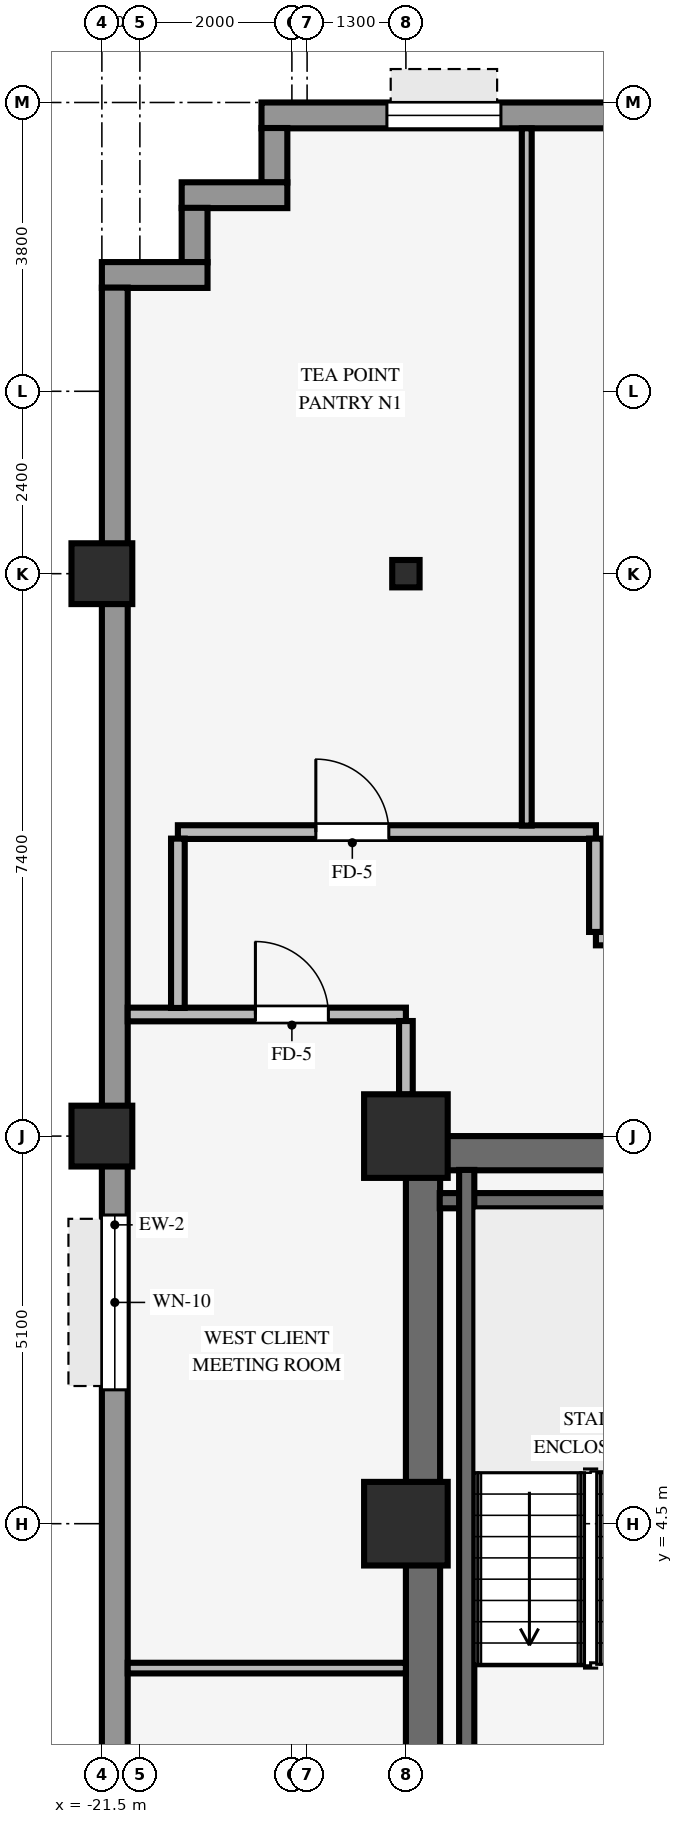
"""IFC4 building model, lengths in metres.
Left out: names, types, materials, properties, quantities, classifications, styles, units other than length and angle.
Written with IfcOpenShell. Run it as: python <this file> out.ifc"""

import sys

from ifc_helpers import new_model, si_unit, direction, frame, frame_2d, origin, origin_2d, place, context, subcontext, project, spatial, rectangle, hollow_rectangle, i_section, extrude, source, transform, mapped, element, fill, save


model = new_model("IFC4")
c1 = context("Model", 3, precision=1e-05, world=origin(), true_north=direction((0.0, 1.0)))
c2 = subcontext(c1, "Body", "Model", "MODEL_VIEW")
j1 = project(units=[si_unit("LENGTHUNIT", "METRE"), si_unit("PLANEANGLEUNIT", "RADIAN")], contexts=[c1])
p1 = place(None, origin())
s1 = spatial("IfcSite", under=j1, at=p1, CompositionType="ELEMENT")
p2 = place(p1, origin())
s2 = spatial("IfcBuilding", under=s1, at=p2, CompositionType="ELEMENT")
p3 = place(p2, frame((0.0, 0.0, 64.1)))
s3 = spatial("IfcBuildingStorey", under=s2, at=p3, CompositionType="ELEMENT", Elevation=64.1)
p4 = place(p3, frame((-17.5, 9.375, 0.0), z_axis=(0.0, 0.0, 1.0), x_axis=(1.0, 0.0, 0.0)))
e1 = element("IfcWall", 1, at=p4, inside=s3, PredefinedType="SHEAR", context=c2, shape_type="SweptSolid", body=[
    extrude(rectangle(XDim=8.5, YDim=0.45, at=frame_2d((4.25, 0.0))), origin(), (0.0, 0.0, 1.0), 3.37),
])
p5 = place(p3, frame((-17.275, -9.155, 0.0), z_axis=(0.0, 0.0, 1.0), x_axis=(0.0, 1.0, 0.0)))
e2 = element("IfcWall", 2, at=p5, inside=s3, PredefinedType="SHEAR", context=c2, shape_type="SweptSolid", body=[
    extrude(rectangle(XDim=18.31, YDim=0.45, at=frame_2d((9.155, 0.0))), origin(), (0.0, 0.0, 1.0), 3.37),
])
for number, where, z_axis, x_axis in (
    (3, (-17.5, 4.5, 0.0), (0.0, 0.0, 1.0), (1.0, 0.0, 0.0)),
    (4, (-17.5, 9.6, 0.0), (0.0, 0.0, 1.0), (1.0, 0.0, 0.0)),
):
    element("IfcColumn", number, at=place(p3, frame(where, z_axis=z_axis, x_axis=x_axis)), inside=s3, PredefinedType="COLUMN", context=c2, shape_type="SweptSolid", body=[
        extrude(rectangle(XDim=1.1, YDim=1.1, at=origin_2d()), origin(), (0.0, 0.0, 1.0), 3.37),
    ])
for number, where, z_axis, x_axis in (
    (5, (-21.5, 9.6, 0.0), (0.0, 0.0, 1.0), (1.0, 0.0, 0.0)),
    (6, (-21.5, 17.0, 0.0), (0.0, 0.0, 1.0), (1.0, 0.0, 0.0)),
):
    element("IfcColumn", number, at=place(p3, frame(where, z_axis=z_axis, x_axis=x_axis)), inside=s3, PredefinedType="COLUMN", context=c2, shape_type="SweptSolid", body=[
        extrude(hollow_rectangle(XDim=0.8, YDim=0.8, WallThickness=0.055, InnerFilletRadius=0.055, OuterFilletRadius=0.11, at=origin_2d()), origin(), (0.0, 0.0, 1.0), 3.37),
    ])
p6 = place(p3, frame((-17.5, 17.0, 0.0), z_axis=(0.0, 0.0, 1.0), x_axis=(1.0, 0.0, 0.0)))
e7 = element("IfcColumn", 7, at=p6, inside=s3, PredefinedType="COLUMN", context=c2, shape_type="SweptSolid", body=[
    extrude(i_section(OverallWidth=0.36, OverallDepth=0.36, WebThickness=0.021, FlangeThickness=0.021, FilletRadius=0.018, at=origin_2d()), origin(), (0.0, 0.0, 1.0), 3.37),
])
p7 = place(p3, frame((-19.4, 23.03, 0.0), z_axis=(0.0, 0.0, 1.0), x_axis=(1.0, 0.0, 0.0)))
e8 = element("IfcWall", 8, at=p7, inside=s3, PredefinedType="STANDARD", context=c2, shape_type="SweptSolid", body=[
    extrude(rectangle(XDim=38.8, YDim=0.34, at=frame_2d((19.4, 0.0))), origin(), (0.0, 0.0, 1.0), 2.705),
])
p8 = place(p7, frame((1.65, 0.0, 0.8)))
e9 = element("IfcOpeningElement", 9, at=p8, cuts=e8, PredefinedType="OPENING", context=c2, shape_type="SweptSolid", body=[
    extrude(rectangle(XDim=1.5, YDim=1.6, at=frame_2d((0.75, 0.8))), frame((0.0, 0.18, 0.0), z_axis=(0.0, -1.0, 0.0), x_axis=(1.0, 0.0, 0.0)), (0.0, 0.0, 1.0), 0.36),
])
p9 = place(p7, frame((7.15, 0.0, 0.8)))
e10 = element("IfcOpeningElement", 10, at=p9, cuts=e8, PredefinedType="OPENING", context=c2, shape_type="SweptSolid", body=[
    extrude(rectangle(XDim=1.5, YDim=1.6, at=frame_2d((0.75, 0.8))), frame((0.0, 0.18, 0.0), z_axis=(0.0, -1.0, 0.0), x_axis=(1.0, 0.0, 0.0)), (0.0, 0.0, 1.0), 0.36),
])
p10 = place(p7, frame((11.75, 0.0, 0.8)))
e11 = element("IfcOpeningElement", 11, at=p10, cuts=e8, PredefinedType="OPENING", context=c2, shape_type="SweptSolid", body=[
    extrude(rectangle(XDim=1.5, YDim=1.6, at=frame_2d((0.75, 0.8))), frame((0.0, 0.18, 0.0), z_axis=(0.0, -1.0, 0.0), x_axis=(1.0, 0.0, 0.0)), (0.0, 0.0, 1.0), 0.36),
])
p11 = place(p7, frame((16.35, 0.0, 0.8)))
e12 = element("IfcOpeningElement", 12, at=p11, cuts=e8, PredefinedType="OPENING", context=c2, shape_type="SweptSolid", body=[
    extrude(rectangle(XDim=1.5, YDim=1.6, at=frame_2d((0.75, 0.8))), frame((0.0, 0.18, 0.0), z_axis=(0.0, -1.0, 0.0), x_axis=(1.0, 0.0, 0.0)), (0.0, 0.0, 1.0), 0.36),
])
p12 = place(p7, frame((20.95, 0.0, 0.8)))
e13 = element("IfcOpeningElement", 13, at=p12, cuts=e8, PredefinedType="OPENING", context=c2, shape_type="SweptSolid", body=[
    extrude(rectangle(XDim=1.5, YDim=1.6, at=frame_2d((0.75, 0.8))), frame((0.0, 0.18, 0.0), z_axis=(0.0, -1.0, 0.0), x_axis=(1.0, 0.0, 0.0)), (0.0, 0.0, 1.0), 0.36),
])
p13 = place(p7, frame((25.55, 0.0, 0.8)))
e14 = element("IfcOpeningElement", 14, at=p13, cuts=e8, PredefinedType="OPENING", context=c2, shape_type="SweptSolid", body=[
    extrude(rectangle(XDim=1.5, YDim=1.6, at=frame_2d((0.75, 0.8))), frame((0.0, 0.18, 0.0), z_axis=(0.0, -1.0, 0.0), x_axis=(1.0, 0.0, 0.0)), (0.0, 0.0, 1.0), 0.36),
])
p14 = place(p7, frame((30.15, 0.0, 0.8)))
e15 = element("IfcOpeningElement", 15, at=p14, cuts=e8, PredefinedType="OPENING", context=c2, shape_type="SweptSolid", body=[
    extrude(rectangle(XDim=1.5, YDim=1.6, at=frame_2d((0.75, 0.8))), frame((0.0, 0.18, 0.0), z_axis=(0.0, -1.0, 0.0), x_axis=(1.0, 0.0, 0.0)), (0.0, 0.0, 1.0), 0.36),
])
p15 = place(p7, frame((34.75, 0.0, 0.8)))
e16 = element("IfcOpeningElement", 16, at=p15, cuts=e8, PredefinedType="OPENING", context=c2, shape_type="SweptSolid", body=[
    extrude(rectangle(XDim=1.5, YDim=1.6, at=frame_2d((0.75, 0.8))), frame((0.0, 0.18, 0.0), z_axis=(0.0, -1.0, 0.0), x_axis=(1.0, 0.0, 0.0)), (0.0, 0.0, 1.0), 0.36),
])
p16 = place(p3, frame((-19.23, 22.146, 0.0), z_axis=(0.0, 0.0, 1.0), x_axis=(0.0, 1.0, 0.0)))
e17 = element("IfcWall", 17, at=p16, inside=s3, PredefinedType="STANDARD", context=c2, shape_type="SweptSolid", body=[
    extrude(rectangle(XDim=0.718, YDim=0.34, at=frame_2d((0.359, 0.0))), origin(), (0.0, 0.0, 1.0), 3.36),
])
p17 = place(p3, frame((-20.45, 21.98, 0.0), z_axis=(0.0, 0.0, 1.0), x_axis=(1.0, 0.0, 0.0)))
e18 = element("IfcWall", 18, at=p17, inside=s3, PredefinedType="STANDARD", context=c2, shape_type="SweptSolid", body=[
    extrude(rectangle(XDim=1.39, YDim=0.34, at=frame_2d((0.695, 0.0))), origin(), (0.0, 0.0, 1.0), 3.36),
])
p18 = place(p3, frame((-20.28, 21.096, 0.0), z_axis=(0.0, 0.0, 1.0), x_axis=(0.0, 1.0, 0.0)))
e19 = element("IfcWall", 19, at=p18, inside=s3, PredefinedType="STANDARD", context=c2, shape_type="SweptSolid", body=[
    extrude(rectangle(XDim=0.718, YDim=0.34, at=frame_2d((0.359, 0.0))), origin(), (0.0, 0.0, 1.0), 3.36),
])
p19 = place(p3, frame((-21.5, 20.93, 0.0), z_axis=(0.0, 0.0, 1.0), x_axis=(1.0, 0.0, 0.0)))
e20 = element("IfcWall", 20, at=p19, inside=s3, PredefinedType="STANDARD", context=c2, shape_type="SweptSolid", body=[
    extrude(rectangle(XDim=1.39, YDim=0.34, at=frame_2d((0.695, 0.0))), origin(), (0.0, 0.0, 1.0), 3.36),
])
p20 = place(p3, frame((-21.33, -20.764, 0.0), z_axis=(0.0, 0.0, 1.0), x_axis=(0.0, 1.0, 0.0)))
e21 = element("IfcWall", 21, at=p20, inside=s3, PredefinedType="STANDARD", context=c2, shape_type="SweptSolid", body=[
    extrude(rectangle(XDim=41.528, YDim=0.34, at=frame_2d((20.764, 0.0))), origin(), (0.0, 0.0, 1.0), 2.705),
])
p21 = place(p20, frame((15.364, 0.0, 0.0)))
e22 = element("IfcOpeningElement", 22, at=p21, cuts=e21, PredefinedType="OPENING", context=c2, shape_type="SweptSolid", body=[
    extrude(rectangle(XDim=1.05, YDim=2.1, at=frame_2d((0.525, 1.05))), frame((0.0, 0.18, 0.0), z_axis=(0.0, -1.0, 0.0), x_axis=(1.0, 0.0, 0.0)), (0.0, 0.0, 1.0), 0.36),
])
p22 = place(p20, frame((12.202, 0.0, 0.8)))
e23 = element("IfcOpeningElement", 23, at=p22, cuts=e21, PredefinedType="OPENING", context=c2, shape_type="SweptSolid", body=[
    extrude(rectangle(XDim=2.3, YDim=1.62, at=frame_2d((1.15, 0.81))), frame((0.0, 0.18, 0.0), z_axis=(0.0, -1.0, 0.0), x_axis=(1.0, 0.0, 0.0)), (0.0, 0.0, 1.0), 0.36),
])
p23 = place(p20, frame((17.144, 0.0, 0.8)))
e24 = element("IfcOpeningElement", 24, at=p23, cuts=e21, PredefinedType="OPENING", context=c2, shape_type="SweptSolid", body=[
    extrude(rectangle(XDim=2.3, YDim=1.62, at=frame_2d((1.15, 0.81))), frame((0.0, 0.18, 0.0), z_axis=(0.0, -1.0, 0.0), x_axis=(1.0, 0.0, 0.0)), (0.0, 0.0, 1.0), 0.36),
])
p24 = place(p20, frame((27.025, 0.0, 0.8)))
e25 = element("IfcOpeningElement", 25, at=p24, cuts=e21, PredefinedType="OPENING", context=c2, shape_type="SweptSolid", body=[
    extrude(rectangle(XDim=2.3, YDim=1.62, at=frame_2d((1.15, 0.81))), frame((0.0, 0.18, 0.0), z_axis=(0.0, -1.0, 0.0), x_axis=(1.0, 0.0, 0.0)), (0.0, 0.0, 1.0), 0.36),
])
p25 = place(p3, frame((-17.055, 8.75, 0.0), z_axis=(0.0, 0.0, 1.0), x_axis=(1.0, 0.0, 0.0)))
e26 = element("IfcWall", 26, at=p25, inside=s3, PredefinedType="SHEAR", context=c2, shape_type="SweptSolid", body=[
    extrude(rectangle(XDim=3.52, YDim=0.2, at=frame_2d((1.76, 0.0))), origin(), (0.0, 0.0, 1.0), 3.37),
])
p26 = place(p3, frame((-16.7, 1.095, 0.0), z_axis=(0.0, 0.0, 1.0), x_axis=(0.0, 1.0, 0.0)))
e27 = element("IfcWall", 27, at=p26, inside=s3, PredefinedType="SHEAR", context=c2, shape_type="SweptSolid", body=[
    extrude(rectangle(XDim=8.06, YDim=0.2, at=frame_2d((4.03, 0.0))), origin(), (0.0, 0.0, 1.0), 3.37),
])
p27 = place(p3, frame((-21.16, 2.6, 0.0), z_axis=(0.0, 0.0, 1.0), x_axis=(1.0, 0.0, 0.0)))
e28 = element("IfcWall", 28, at=p27, inside=s3, PredefinedType="PARTITIONING", context=c2, shape_type="SweptSolid", body=[
    extrude(rectangle(XDim=3.66, YDim=0.14, at=frame_2d((1.83, 0.0))), origin(), (0.0, 0.0, 1.0), 3.36),
])
p28 = place(p3, frame((-21.16, 11.2, 0.0), z_axis=(0.0, 0.0, 1.0), x_axis=(1.0, 0.0, 0.0)))
e29 = element("IfcWall", 29, at=p28, inside=s3, PredefinedType="PARTITIONING", context=c2, shape_type="SweptSolid", body=[
    extrude(rectangle(XDim=3.66, YDim=0.18, at=frame_2d((1.83, 0.0))), origin(), (0.0, 0.0, 1.0), 3.36),
])
p29 = place(p28, frame((1.68, 0.0, 0.0)))
e30 = element("IfcOpeningElement", 30, at=p29, cuts=e29, PredefinedType="OPENING", context=c2, shape_type="SweptSolid", body=[
    extrude(rectangle(XDim=0.96, YDim=2.1, at=frame_2d((0.48, 1.05))), frame((0.0, 0.1, 0.0), z_axis=(0.0, -1.0, 0.0), x_axis=(1.0, 0.0, 0.0)), (0.0, 0.0, 1.0), 0.2),
])
p30 = place(p3, frame((-15.0, 12.2, 0.0), z_axis=(0.0, 0.0, 1.0), x_axis=(1.0, 0.0, 0.0)))
e31 = element("IfcWall", 31, at=p30, inside=s3, PredefinedType="PARTITIONING", context=c2, shape_type="SweptSolid", body=[
    extrude(rectangle(XDim=30.0, YDim=0.18, at=frame_2d((15.0, 0.0))), origin(), (0.0, 0.0, 1.0), 3.36),
])
p31 = place(p30, frame((2.195, 0.0, 0.0)))
e32 = element("IfcOpeningElement", 32, at=p31, cuts=e31, PredefinedType="OPENING", context=c2, shape_type="SweptSolid", body=[
    extrude(rectangle(XDim=0.96, YDim=2.1, at=frame_2d((0.48, 1.05))), frame((0.0, 0.1, 0.0), z_axis=(0.0, -1.0, 0.0), x_axis=(1.0, 0.0, 0.0)), (0.0, 0.0, 1.0), 0.2),
])
p32 = place(p30, frame((16.395, 0.0, 0.0)))
e33 = element("IfcOpeningElement", 33, at=p32, cuts=e31, PredefinedType="OPENING", context=c2, shape_type="SweptSolid", body=[
    extrude(rectangle(XDim=0.96, YDim=2.1, at=frame_2d((0.48, 1.05))), frame((0.0, 0.1, 0.0), z_axis=(0.0, -1.0, 0.0), x_axis=(1.0, 0.0, 0.0)), (0.0, 0.0, 1.0), 0.2),
])
p33 = place(p30, frame((21.62, 0.0, 0.0)))
e34 = element("IfcOpeningElement", 34, at=p33, cuts=e31, PredefinedType="OPENING", context=c2, shape_type="SweptSolid", body=[
    extrude(rectangle(XDim=0.96, YDim=2.1, at=frame_2d((0.48, 1.05))), frame((0.0, 0.1, 0.0), z_axis=(0.0, -1.0, 0.0), x_axis=(1.0, 0.0, 0.0)), (0.0, 0.0, 1.0), 0.2),
])
p34 = place(p30, frame((7.33, 0.0, 0.0)))
e35 = element("IfcOpeningElement", 35, at=p34, cuts=e31, PredefinedType="OPENING", context=c2, shape_type="SweptSolid", body=[
    extrude(rectangle(XDim=0.96, YDim=2.1, at=frame_2d((0.48, 1.05))), frame((0.0, 0.1, 0.0), z_axis=(0.0, -1.0, 0.0), x_axis=(1.0, 0.0, 0.0)), (0.0, 0.0, 1.0), 0.2),
])
p35 = place(p30, frame((26.08, 0.0, 0.0)))
e36 = element("IfcOpeningElement", 36, at=p35, cuts=e31, PredefinedType="OPENING", context=c2, shape_type="SweptSolid", body=[
    extrude(rectangle(XDim=0.96, YDim=2.1, at=frame_2d((0.48, 1.05))), frame((0.0, 0.1, 0.0), z_axis=(0.0, -1.0, 0.0), x_axis=(1.0, 0.0, 0.0)), (0.0, 0.0, 1.0), 0.2),
])
p36 = place(p30, frame((12.52, 0.0, 0.0)))
e37 = element("IfcOpeningElement", 37, at=p36, cuts=e31, PredefinedType="OPENING", context=c2, shape_type="SweptSolid", body=[
    extrude(rectangle(XDim=0.96, YDim=2.1, at=frame_2d((0.48, 1.05))), frame((0.0, 0.1, 0.0), z_axis=(0.0, -1.0, 0.0), x_axis=(1.0, 0.0, 0.0)), (0.0, 0.0, 1.0), 0.2),
])
p37 = place(p3, frame((-20.5, 13.6, 0.0), z_axis=(0.0, 0.0, 1.0), x_axis=(1.0, 0.0, 0.0)))
e38 = element("IfcWall", 38, at=p37, inside=s3, PredefinedType="PARTITIONING", context=c2, shape_type="SweptSolid", body=[
    extrude(rectangle(XDim=5.5, YDim=0.18, at=frame_2d((2.75, 0.0))), origin(), (0.0, 0.0, 1.0), 2.942),
])
p38 = place(p37, frame((1.815, 0.0, 0.0)))
e39 = element("IfcOpeningElement", 39, at=p38, cuts=e38, PredefinedType="OPENING", context=c2, shape_type="SweptSolid", body=[
    extrude(rectangle(XDim=0.96, YDim=2.1, at=frame_2d((0.48, 1.05))), frame((0.0, 0.1, 0.0), z_axis=(0.0, -1.0, 0.0), x_axis=(1.0, 0.0, 0.0)), (0.0, 0.0, 1.0), 0.2),
])
p39 = place(p3, frame((-20.5, 11.286, 0.0), z_axis=(0.0, 0.0, 1.0), x_axis=(0.0, 1.0, 0.0)))
e40 = element("IfcWall", 40, at=p39, inside=s3, PredefinedType="PARTITIONING", context=c2, shape_type="SweptSolid", body=[
    extrude(rectangle(XDim=2.228, YDim=0.18, at=frame_2d((1.114, 0.0))), origin(), (0.0, 0.0, 1.0), 3.36),
])
p40 = place(p3, frame((-17.5, 10.146, 0.0), z_axis=(0.0, 0.0, 1.0), x_axis=(0.0, 1.0, 0.0)))
e41 = element("IfcWall", 41, at=p40, inside=s3, PredefinedType="PARTITIONING", context=c2, shape_type="SweptSolid", body=[
    extrude(rectangle(XDim=0.968, YDim=0.18, at=frame_2d((0.484, 0.0))), origin(), (0.0, 0.0, 1.0), 2.738),
])
p41 = place(p3, frame((-15.91, 13.686, 0.0), z_axis=(0.0, 0.0, 1.0), x_axis=(0.0, 1.0, 0.0)))
e42 = element("IfcWall", 42, at=p41, inside=s3, PredefinedType="PARTITIONING", context=c2, shape_type="SweptSolid", body=[
    extrude(rectangle(XDim=9.174, YDim=0.13, at=frame_2d((4.587, 0.0))), origin(), (0.0, 0.0, 1.0), 3.36),
])
p42 = place(p3, frame((-15.0, 12.286, 0.0), z_axis=(0.0, 0.0, 1.0), x_axis=(0.0, 1.0, 0.0)))
e43 = element("IfcWall", 43, at=p42, inside=s3, PredefinedType="PARTITIONING", context=c2, shape_type="SweptSolid", body=[
    extrude(rectangle(XDim=1.228, YDim=0.18, at=frame_2d((0.614, 0.0))), origin(), (0.0, 0.0, 1.0), 3.36),
])
m1 = source(origin(), c2, "Body", "SweptSolid", [
    extrude(rectangle(XDim=1.5, YDim=1.6, at=frame_2d((0.75, 0.8))), frame((0.0, 0.03, 0.0), z_axis=(0.0, -1.0, 0.0), x_axis=(1.0, 0.0, 0.0)), (0.0, 0.0, 1.0), 0.06),
])
p43 = place(p8, origin())
e44 = element("IfcWindow", 44, at=p43, inside=s3, PartitioningType="SINGLE_PANEL", PredefinedType="WINDOW", context=c2, shape_type="MappedRepresentation", body=[
    mapped(m1, transform((0.0, 0.0, 0.0), scale=1.0)),
])
fill(e9, e44)
m2 = source(origin(), c2, "Body", "SweptSolid", [
    extrude(rectangle(XDim=2.3, YDim=1.62, at=frame_2d((1.15, 0.81))), frame((0.0, 0.03, 0.0), z_axis=(0.0, -1.0, 0.0), x_axis=(1.0, 0.0, 0.0)), (0.0, 0.0, 1.0), 0.06),
])
p44 = place(p24, origin())
e45 = element("IfcWindow", 45, at=p44, inside=s3, PartitioningType="SINGLE_PANEL", PredefinedType="WINDOW", context=c2, shape_type="MappedRepresentation", body=[
    mapped(m2, transform((0.0, 0.0, 0.0), scale=1.0)),
])
fill(e25, e45)
m3 = source(origin(), c2, "Body", "SweptSolid", [
    extrude(rectangle(XDim=0.96, YDim=2.1, at=frame_2d((0.48, 1.05))), frame((0.0, 0.025, 0.0), z_axis=(0.0, -1.0, 0.0), x_axis=(1.0, 0.0, 0.0)), (0.0, 0.0, 1.0), 0.05),
])
p45 = place(p38, origin())
e46 = element("IfcDoor", 46, at=p45, inside=s3, OperationType="SINGLE_SWING_LEFT", PredefinedType="DOOR", context=c2, shape_type="MappedRepresentation", body=[
    mapped(m3, transform((0.0, 0.0, 0.0), scale=1.0)),
])
fill(e39, e46)
p46 = place(p29, origin())
e47 = element("IfcDoor", 47, at=p46, inside=s3, OperationType="SINGLE_SWING_LEFT", PredefinedType="DOOR", context=c2, shape_type="MappedRepresentation", body=[
    mapped(m3, transform((0.0, 0.0, 0.0), scale=1.0)),
])
fill(e30, e47)
save(model, sys.argv[1])
